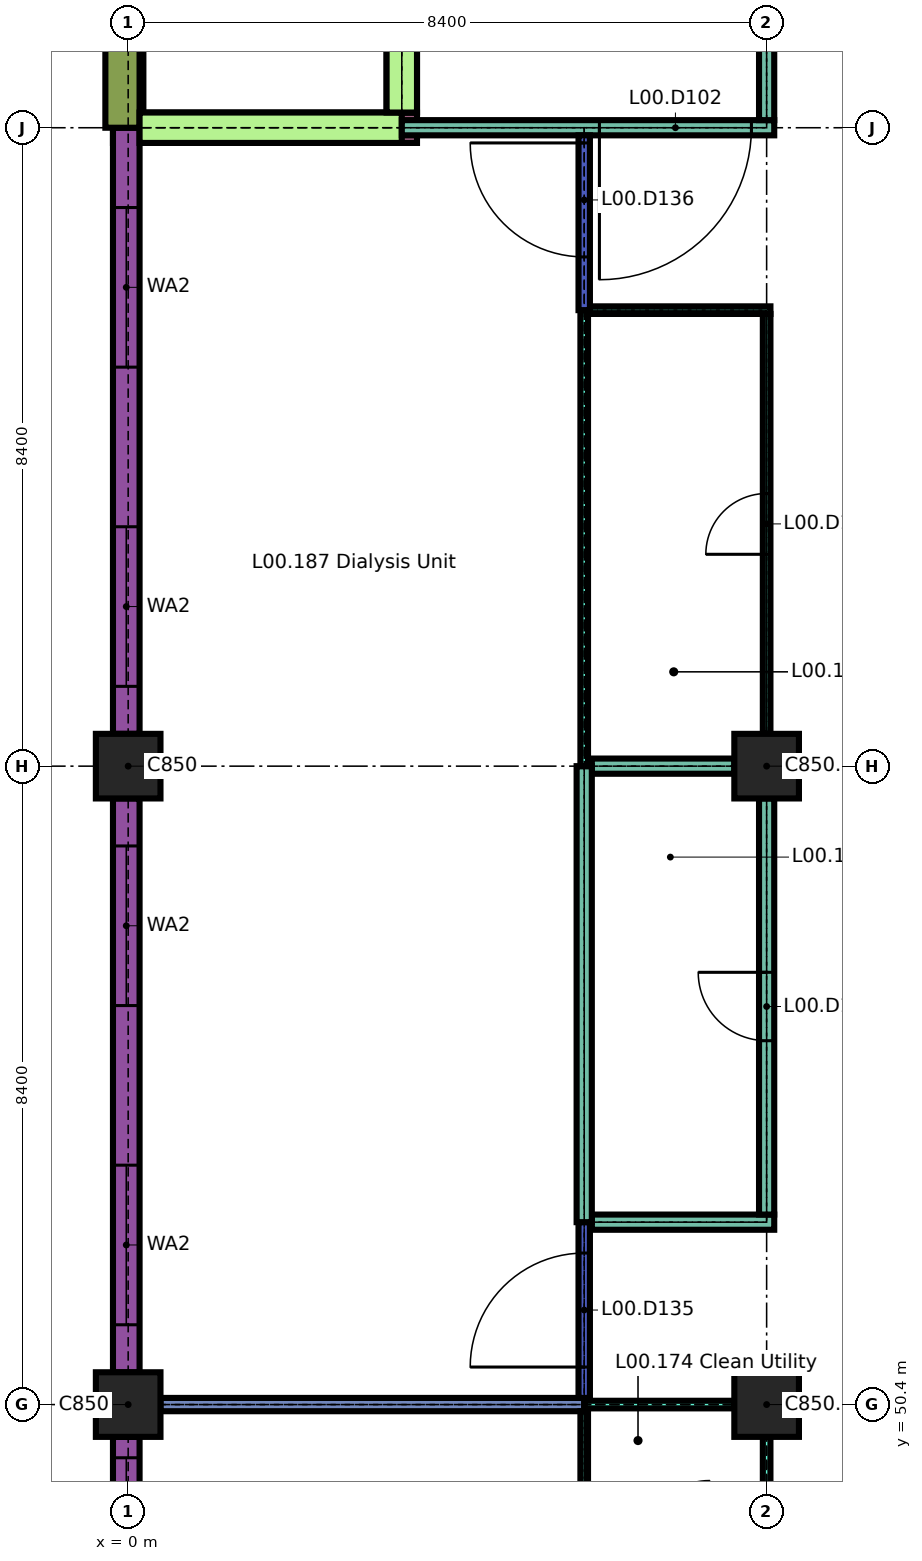
"""IFC4 building model, lengths in metres.
Left out: names, types, materials, properties, quantities, classifications, styles, units other than length and angle.
Written with IfcOpenShell. Run it as: python <this file> out.ifc"""

import sys

from ifc_helpers import new_model, si_unit, direction, frame, frame_2d, origin, origin_2d, place, context, subcontext, project, spatial, rectangle, extrude, element, fill, save


model = new_model("IFC4")
c1 = context("Model", 3, precision=1e-05, world=origin(), true_north=direction((0.0, 1.0)))
c2 = subcontext(c1, "Body", "Model", "MODEL_VIEW")
j1 = project(units=[si_unit("LENGTHUNIT", "METRE"), si_unit("PLANEANGLEUNIT", "RADIAN")], contexts=[c1])
p1 = place(None, origin())
s1 = spatial("IfcSite", under=j1, at=p1, CompositionType="ELEMENT")
p2 = place(p1, origin())
s2 = spatial("IfcBuilding", under=s1, at=p2, CompositionType="ELEMENT")
p3 = place(p2, origin())
s3 = spatial("IfcBuildingStorey", under=s2, at=p3, CompositionType="ELEMENT", Elevation=0.0)
p4 = place(p3, frame((-0.2, 67.2, -1.4), z_axis=(0.0, 0.0, 1.0), x_axis=(1.0, 0.0, 0.0)))
e1 = element("IfcWall", 1, at=p4, inside=s3, PredefinedType="SOLIDWALL", context=c2, shape_type="SweptSolid", body=[
    extrude(rectangle(XDim=4.0, YDim=0.4, at=frame_2d((2.0, 0.0))), origin(), (0.0, 0.0, 1.0), 0.95),
])
for number, where, z_axis, x_axis in (
    (2, (0.0, 67.4, -1.4), (0.0, 0.0, 1.0), (0.0, 1.0, 0.0)),
    (3, (3.6, 67.4, -1.4), (0.0, 0.0, 1.0), (0.0, 1.0, 0.0)),
):
    element("IfcWall", number, at=place(p3, frame(where, z_axis=z_axis, x_axis=x_axis)), inside=s3, PredefinedType="SOLIDWALL", context=c2, shape_type="SweptSolid", body=[
        extrude(rectangle(XDim=8.0, YDim=0.4, at=frame_2d((4.0, 0.0))), origin(), (0.0, 0.0, 1.0), 0.95),
    ])
for number, where, z_axis, x_axis in (
    (4, (0.0, 50.4, 0.0), (0.0, 0.0, 1.0), (1.0, 0.0, 0.0)),
    (5, (8.4, 50.4, 0.0), (0.0, 0.0, 1.0), (1.0, 0.0, 0.0)),
    (6, (0.0, 58.8, 0.0), (0.0, 0.0, 1.0), (1.0, 0.0, 0.0)),
    (7, (8.4, 58.8, 0.0), (0.0, 0.0, 1.0), (1.0, 0.0, 0.0)),
):
    element("IfcColumn", number, at=place(p3, frame(where, z_axis=z_axis, x_axis=x_axis)), inside=s3, PredefinedType="COLUMN", context=c2, shape_type="SweptSolid", body=[
        extrude(rectangle(XDim=0.85, YDim=0.85, at=origin_2d()), origin(), (0.0, 0.0, 1.0), 4.14),
    ])
p5 = place(p3, frame((-0.025, 46.2, 0.0), z_axis=(0.0, 0.0, 1.0), x_axis=(0.0, 1.0, 0.0)))
e8 = element("IfcWall", 8, at=p5, inside=s3, PredefinedType="SOLIDWALL", context=c2, shape_type="SweptSolid", body=[
    extrude(rectangle(XDim=3.775, YDim=0.35, at=frame_2d((1.888, 0.0))), origin(), (0.0, 0.0, 1.0), 3.84),
])
p6 = place(p5, frame((0.7, 0.0, 1.0)))
e9 = element("IfcOpeningElement", 9, at=p6, cuts=e8, PredefinedType="OPENING", context=c2, shape_type="SweptSolid", body=[
    extrude(rectangle(XDim=2.8, YDim=1.5, at=frame_2d((1.4, 0.75))), frame((0.0, 0.185, 0.0), z_axis=(0.0, -1.0, 0.0), x_axis=(1.0, 0.0, 0.0)), (0.0, 0.0, 1.0), 0.37),
])
p7 = place(p3, frame((-0.025, 50.825, 0.0), z_axis=(0.0, 0.0, 1.0), x_axis=(0.0, 1.0, 0.0)))
e10 = element("IfcWall", 10, at=p7, inside=s3, PredefinedType="SOLIDWALL", context=c2, shape_type="SweptSolid", body=[
    extrude(rectangle(XDim=7.55, YDim=0.35, at=frame_2d((3.775, 0.0))), origin(), (0.0, 0.0, 1.0), 3.84),
])
p8 = place(p7, frame((0.625, 0.0, 0.9)))
e11 = element("IfcOpeningElement", 11, at=p8, cuts=e10, PredefinedType="OPENING", context=c2, shape_type="SweptSolid", body=[
    extrude(rectangle(XDim=2.1, YDim=2.1, at=frame_2d((1.05, 1.05))), frame((0.0, 0.185, 0.0), z_axis=(0.0, -1.0, 0.0), x_axis=(1.0, 0.0, 0.0)), (0.0, 0.0, 1.0), 0.37),
])
p9 = place(p7, frame((4.825, 0.0, 0.9)))
e12 = element("IfcOpeningElement", 12, at=p9, cuts=e10, PredefinedType="OPENING", context=c2, shape_type="SweptSolid", body=[
    extrude(rectangle(XDim=2.1, YDim=2.1, at=frame_2d((1.05, 1.05))), frame((0.0, 0.185, 0.0), z_axis=(0.0, -1.0, 0.0), x_axis=(1.0, 0.0, 0.0)), (0.0, 0.0, 1.0), 0.37),
])
p10 = place(p3, frame((-0.025, 59.225, 0.0), z_axis=(0.0, 0.0, 1.0), x_axis=(0.0, 1.0, 0.0)))
e13 = element("IfcWall", 13, at=p10, inside=s3, PredefinedType="SOLIDWALL", context=c2, shape_type="SweptSolid", body=[
    extrude(rectangle(XDim=7.975, YDim=0.35, at=frame_2d((3.987, 0.0))), origin(), (0.0, 0.0, 1.0), 3.84),
])
p11 = place(p10, frame((0.625, 0.0, 0.9)))
e14 = element("IfcOpeningElement", 14, at=p11, cuts=e13, PredefinedType="OPENING", context=c2, shape_type="SweptSolid", body=[
    extrude(rectangle(XDim=2.1, YDim=2.1, at=frame_2d((1.05, 1.05))), frame((0.0, 0.185, 0.0), z_axis=(0.0, -1.0, 0.0), x_axis=(1.0, 0.0, 0.0)), (0.0, 0.0, 1.0), 0.37),
])
p12 = place(p10, frame((4.825, 0.0, 0.9)))
e15 = element("IfcOpeningElement", 15, at=p12, cuts=e13, PredefinedType="OPENING", context=c2, shape_type="SweptSolid", body=[
    extrude(rectangle(XDim=2.1, YDim=2.1, at=frame_2d((1.05, 1.05))), frame((0.0, 0.185, 0.0), z_axis=(0.0, -1.0, 0.0), x_axis=(1.0, 0.0, 0.0)), (0.0, 0.0, 1.0), 0.37),
])
p13 = place(p3, frame((-0.075, 67.2, 0.0), z_axis=(0.0, 0.0, 1.0), x_axis=(0.0, 1.0, 0.0)))
e16 = element("IfcWall", 16, at=p13, inside=s3, PredefinedType="SOLIDWALL", context=c2, shape_type="SweptSolid", body=[
    extrude(rectangle(XDim=4.2, YDim=0.45, at=frame_2d((2.1, 0.0))), origin(), (0.0, 0.0, 1.0), 4.14),
])
p14 = place(p3, frame((0.425, 50.4, 0.0), z_axis=(0.0, 0.0, 1.0), x_axis=(1.0, 0.0, 0.0)))
e17 = element("IfcWall", 17, at=p14, inside=s3, PredefinedType="PARTITIONING", context=c2, shape_type="SweptSolid", body=[
    extrude(rectangle(XDim=5.575, YDim=0.175, at=frame_2d((2.788, 0.0))), origin(), (0.0, 0.0, 1.0), 4.14),
])
p15 = place(p3, frame((6.0, 50.4, 0.0), z_axis=(0.0, 0.0, 1.0), x_axis=(1.0, 0.0, 0.0)))
e18 = element("IfcWall", 18, at=p15, inside=s3, PredefinedType="PARTITIONING", context=c2, shape_type="SweptSolid", body=[
    extrude(rectangle(XDim=1.975, YDim=0.1, at=frame_2d((0.988, 0.0))), origin(), (0.0, 0.0, 1.0), 4.14),
])
p16 = place(p3, frame((6.1, 52.8, 0.0), z_axis=(0.0, 0.0, 1.0), x_axis=(1.0, 0.0, 0.0)))
e19 = element("IfcWall", 19, at=p16, inside=s3, PredefinedType="PARTITIONING", context=c2, shape_type="SweptSolid", body=[
    extrude(rectangle(XDim=2.4, YDim=0.2, at=frame_2d((1.2, 0.0))), origin(), (0.0, 0.0, 1.0), 4.14),
])
p17 = place(p3, frame((6.1, 58.8, 0.0), z_axis=(0.0, 0.0, 1.0), x_axis=(1.0, 0.0, 0.0)))
e20 = element("IfcWall", 20, at=p17, inside=s3, PredefinedType="PARTITIONING", context=c2, shape_type="SweptSolid", body=[
    extrude(rectangle(XDim=1.875, YDim=0.2, at=frame_2d((0.938, 0.0))), origin(), (0.0, 0.0, 1.0), 4.14),
])
p18 = place(p3, frame((6.075, 64.8, 0.0), z_axis=(0.0, 0.0, 1.0), x_axis=(1.0, 0.0, 0.0)))
e21 = element("IfcWall", 21, at=p18, inside=s3, PredefinedType="PARTITIONING", context=c2, shape_type="SweptSolid", body=[
    extrude(rectangle(XDim=2.375, YDim=0.1, at=frame_2d((1.188, 0.0))), origin(), (0.0, 0.0, 1.0), 4.14),
])
p19 = place(p3, frame((0.15, 67.2, 0.0), z_axis=(0.0, 0.0, 1.0), x_axis=(1.0, 0.0, 0.0)))
e22 = element("IfcWall", 22, at=p19, inside=s3, PredefinedType="SHEAR", context=c2, shape_type="SweptSolid", body=[
    extrude(rectangle(XDim=3.45, YDim=0.4, at=frame_2d((1.725, 0.0))), origin(), (0.0, 0.0, 1.0), 4.14),
])
p20 = place(p3, frame((3.6, 67.2, 0.0), z_axis=(0.0, 0.0, 1.0), x_axis=(1.0, 0.0, 0.0)))
e23 = element("IfcWall", 23, at=p20, inside=s3, PredefinedType="PARTITIONING", context=c2, shape_type="SweptSolid", body=[
    extrude(rectangle(XDim=4.9, YDim=0.2, at=frame_2d((2.45, 0.0))), origin(), (0.0, 0.0, 1.0), 4.14),
])
p21 = place(p20, frame((2.6, 0.0, 0.0)))
e24 = element("IfcOpeningElement", 24, at=p21, cuts=e23, PredefinedType="OPENING", context=c2, shape_type="SweptSolid", body=[
    extrude(rectangle(XDim=2.0, YDim=2.4, at=frame_2d((1.0, 1.2))), frame((0.0, 0.11, 0.0), z_axis=(0.0, -1.0, 0.0), x_axis=(1.0, 0.0, 0.0)), (0.0, 0.0, 1.0), 0.22),
])
p22 = place(p3, frame((3.6, 67.4, 0.0), z_axis=(0.0, 0.0, 1.0), x_axis=(0.0, 1.0, 0.0)))
e25 = element("IfcWall", 25, at=p22, inside=s3, PredefinedType="SHEAR", context=c2, shape_type="SweptSolid", body=[
    extrude(rectangle(XDim=8.1, YDim=0.4, at=frame_2d((4.05, 0.0))), origin(), (0.0, 0.0, 1.0), 4.14),
])
p23 = place(p22, frame((1.35, 0.0, 0.0)))
e26 = element("IfcOpeningElement", 26, at=p23, cuts=e25, PredefinedType="OPENING", context=c2, shape_type="SweptSolid", body=[
    extrude(rectangle(XDim=1.3, YDim=2.1, at=frame_2d((0.65, 1.05))), frame((0.0, 0.21, 0.0), z_axis=(0.0, -1.0, 0.0), x_axis=(1.0, 0.0, 0.0)), (0.0, 0.0, 1.0), 0.42),
])
p24 = place(p22, frame((5.5, 0.0, 0.0)))
e27 = element("IfcOpeningElement", 27, at=p24, cuts=e25, PredefinedType="OPENING", context=c2, shape_type="SweptSolid", body=[
    extrude(rectangle(XDim=1.1, YDim=2.1, at=frame_2d((0.55, 1.05))), frame((0.0, 0.21, 0.0), z_axis=(0.0, -1.0, 0.0), x_axis=(1.0, 0.0, 0.0)), (0.0, 0.0, 1.0), 0.42),
])
p25 = place(p3, frame((6.0, 48.6, 0.0), z_axis=(0.0, 0.0, 1.0), x_axis=(0.0, 1.0, 0.0)))
e28 = element("IfcWall", 28, at=p25, inside=s3, PredefinedType="PARTITIONING", context=c2, shape_type="SweptSolid", body=[
    extrude(rectangle(XDim=1.712, YDim=0.1, at=frame_2d((0.856, 0.0))), origin(), (0.0, 0.0, 1.0), 4.14),
])
p26 = place(p3, frame((6.0, 50.488, 0.0), z_axis=(0.0, 0.0, 1.0), x_axis=(0.0, 1.0, 0.0)))
e29 = element("IfcWall", 29, at=p26, inside=s3, PredefinedType="PARTITIONING", context=c2, shape_type="SweptSolid", body=[
    extrude(rectangle(XDim=2.312, YDim=0.15, at=frame_2d((1.156, 0.0))), origin(), (0.0, 0.0, 1.0), 4.14),
])
p27 = place(p26, frame((0.406, 0.0, 0.0)))
e30 = element("IfcOpeningElement", 30, at=p27, cuts=e29, PredefinedType="OPENING", context=c2, shape_type="SweptSolid", body=[
    extrude(rectangle(XDim=1.5, YDim=2.4, at=frame_2d((0.75, 1.2))), frame((0.0, 0.085, 0.0), z_axis=(0.0, -1.0, 0.0), x_axis=(1.0, 0.0, 0.0)), (0.0, 0.0, 1.0), 0.17),
])
p28 = place(p3, frame((6.0, 52.8, 0.0), z_axis=(0.0, 0.0, 1.0), x_axis=(0.0, 1.0, 0.0)))
e31 = element("IfcWall", 31, at=p28, inside=s3, PredefinedType="PARTITIONING", context=c2, shape_type="SweptSolid", body=[
    extrude(rectangle(XDim=6.0, YDim=0.2, at=frame_2d((3.0, 0.0))), origin(), (0.0, 0.0, 1.0), 4.14),
])
p29 = place(p3, frame((6.0, 58.8, 0.0), z_axis=(0.0, 0.0, 1.0), x_axis=(0.0, 1.0, 0.0)))
e32 = element("IfcWall", 32, at=p29, inside=s3, PredefinedType="PARTITIONING", context=c2, shape_type="SweptSolid", body=[
    extrude(rectangle(XDim=6.0, YDim=0.1, at=frame_2d((3.0, 0.0))), origin(), (0.0, 0.0, 1.0), 4.14),
])
p30 = place(p3, frame((6.0, 64.8, 0.0), z_axis=(0.0, 0.0, 1.0), x_axis=(0.0, 1.0, 0.0)))
e33 = element("IfcWall", 33, at=p30, inside=s3, PredefinedType="PARTITIONING", context=c2, shape_type="SweptSolid", body=[
    extrude(rectangle(XDim=2.3, YDim=0.15, at=frame_2d((1.15, 0.0))), origin(), (0.0, 0.0, 1.0), 4.14),
])
p31 = place(p30, frame((0.7, 0.0, 0.0)))
e34 = element("IfcOpeningElement", 34, at=p31, cuts=e33, PredefinedType="OPENING", context=c2, shape_type="SweptSolid", body=[
    extrude(rectangle(XDim=1.5, YDim=2.4, at=frame_2d((0.75, 1.2))), frame((0.0, 0.085, 0.0), z_axis=(0.0, -1.0, 0.0), x_axis=(1.0, 0.0, 0.0)), (0.0, 0.0, 1.0), 0.17),
])
p32 = place(p3, frame((8.4, 48.65, 0.0), z_axis=(0.0, 0.0, 1.0), x_axis=(0.0, 1.0, 0.0)))
e35 = element("IfcWall", 35, at=p32, inside=s3, PredefinedType="PARTITIONING", context=c2, shape_type="SweptSolid", body=[
    extrude(rectangle(XDim=1.325, YDim=0.1, at=frame_2d((0.663, 0.0))), origin(), (0.0, 0.0, 1.0), 4.14),
])
p33 = place(p3, frame((8.4, 52.9, 0.0), z_axis=(0.0, 0.0, 1.0), x_axis=(0.0, 1.0, 0.0)))
e36 = element("IfcWall", 36, at=p33, inside=s3, PredefinedType="PARTITIONING", context=c2, shape_type="SweptSolid", body=[
    extrude(rectangle(XDim=5.475, YDim=0.2, at=frame_2d((2.738, 0.0))), origin(), (0.0, 0.0, 1.0), 4.14),
])
p34 = place(p33, frame((2.288, 0.0, 0.0)))
e37 = element("IfcOpeningElement", 37, at=p34, cuts=e36, PredefinedType="OPENING", context=c2, shape_type="SweptSolid", body=[
    extrude(rectangle(XDim=0.9, YDim=2.1, at=frame_2d((0.45, 1.05))), frame((0.0, 0.11, 0.0), z_axis=(0.0, -1.0, 0.0), x_axis=(1.0, 0.0, 0.0)), (0.0, 0.0, 1.0), 0.22),
])
p35 = place(p3, frame((8.4, 59.225, 0.0), z_axis=(0.0, 0.0, 1.0), x_axis=(0.0, 1.0, 0.0)))
e38 = element("IfcWall", 38, at=p35, inside=s3, PredefinedType="PARTITIONING", context=c2, shape_type="SweptSolid", body=[
    extrude(rectangle(XDim=5.525, YDim=0.1, at=frame_2d((2.762, 0.0))), origin(), (0.0, 0.0, 1.0), 4.14),
])
p36 = place(p35, frame((2.363, 0.0, 0.0)))
e39 = element("IfcOpeningElement", 39, at=p36, cuts=e38, PredefinedType="OPENING", context=c2, shape_type="SweptSolid", body=[
    extrude(rectangle(XDim=0.8, YDim=2.1, at=frame_2d((0.4, 1.05))), frame((0.0, 0.06, 0.0), z_axis=(0.0, -1.0, 0.0), x_axis=(1.0, 0.0, 0.0)), (0.0, 0.0, 1.0), 0.12),
])
p37 = place(p3, frame((8.4, 67.3, 0.0), z_axis=(0.0, 0.0, 1.0), x_axis=(0.0, 1.0, 0.0)))
e40 = element("IfcWall", 40, at=p37, inside=s3, PredefinedType="PARTITIONING", context=c2, shape_type="SweptSolid", body=[
    extrude(rectangle(XDim=8.3, YDim=0.2, at=frame_2d((4.15, 0.0))), origin(), (0.0, 0.0, 1.0), 4.14),
])
p38 = place(p6, origin())
e41 = element("IfcWindow", 41, at=p38, inside=s3, PartitioningType="DOUBLE_PANEL_VERTICAL", PredefinedType="WINDOW", context=c2, shape_type="SweptSolid", body=[
    extrude(rectangle(XDim=2.8, YDim=1.5, at=frame_2d((1.4, 0.75))), frame((0.0, 0.03, 0.0), z_axis=(0.0, -1.0, 0.0), x_axis=(1.0, 0.0, 0.0)), (0.0, 0.0, 1.0), 0.06),
])
fill(e9, e41)
p39 = place(p8, origin())
e42 = element("IfcWindow", 42, at=p39, inside=s3, PartitioningType="DOUBLE_PANEL_VERTICAL", PredefinedType="WINDOW", context=c2, shape_type="SweptSolid", body=[
    extrude(rectangle(XDim=2.1, YDim=2.1, at=frame_2d((1.05, 1.05))), frame((0.0, 0.03, 0.0), z_axis=(0.0, -1.0, 0.0), x_axis=(1.0, 0.0, 0.0)), (0.0, 0.0, 1.0), 0.06),
])
fill(e11, e42)
p40 = place(p9, origin())
e43 = element("IfcWindow", 43, at=p40, inside=s3, PartitioningType="DOUBLE_PANEL_VERTICAL", PredefinedType="WINDOW", context=c2, shape_type="SweptSolid", body=[
    extrude(rectangle(XDim=2.1, YDim=2.1, at=frame_2d((1.05, 1.05))), frame((0.0, 0.03, 0.0), z_axis=(0.0, -1.0, 0.0), x_axis=(1.0, 0.0, 0.0)), (0.0, 0.0, 1.0), 0.06),
])
fill(e12, e43)
p41 = place(p11, origin())
e44 = element("IfcWindow", 44, at=p41, inside=s3, PartitioningType="DOUBLE_PANEL_VERTICAL", PredefinedType="WINDOW", context=c2, shape_type="SweptSolid", body=[
    extrude(rectangle(XDim=2.1, YDim=2.1, at=frame_2d((1.05, 1.05))), frame((0.0, 0.03, 0.0), z_axis=(0.0, -1.0, 0.0), x_axis=(1.0, 0.0, 0.0)), (0.0, 0.0, 1.0), 0.06),
])
fill(e14, e44)
p42 = place(p12, origin())
e45 = element("IfcWindow", 45, at=p42, inside=s3, PartitioningType="DOUBLE_PANEL_VERTICAL", PredefinedType="WINDOW", context=c2, shape_type="SweptSolid", body=[
    extrude(rectangle(XDim=2.1, YDim=2.1, at=frame_2d((1.05, 1.05))), frame((0.0, 0.03, 0.0), z_axis=(0.0, -1.0, 0.0), x_axis=(1.0, 0.0, 0.0)), (0.0, 0.0, 1.0), 0.06),
])
fill(e15, e45)
p43 = place(p21, origin())
e46 = element("IfcDoor", 46, at=p43, inside=s3, OperationType="SINGLE_SWING_LEFT", PredefinedType="DOOR", context=c2, shape_type="SweptSolid", body=[
    extrude(rectangle(XDim=2.0, YDim=2.4, at=frame_2d((1.0, 1.2))), frame((0.0, 0.03, 0.0), z_axis=(0.0, -1.0, 0.0), x_axis=(1.0, 0.0, 0.0)), (0.0, 0.0, 1.0), 0.06),
])
fill(e24, e46)
p44 = place(p27, origin())
e47 = element("IfcDoor", 47, at=p44, inside=s3, OperationType="SINGLE_SWING_RIGHT", PredefinedType="DOOR", context=c2, shape_type="SweptSolid", body=[
    extrude(rectangle(XDim=1.5, YDim=2.4, at=frame_2d((0.75, 1.2))), frame((0.0, 0.03, 0.0), z_axis=(0.0, -1.0, 0.0), x_axis=(1.0, 0.0, 0.0)), (0.0, 0.0, 1.0), 0.06),
])
fill(e30, e47)
p45 = place(p31, origin())
e48 = element("IfcDoor", 48, at=p45, inside=s3, OperationType="SINGLE_SWING_LEFT", PredefinedType="DOOR", context=c2, shape_type="SweptSolid", body=[
    extrude(rectangle(XDim=1.5, YDim=2.4, at=frame_2d((0.75, 1.2))), frame((0.0, 0.03, 0.0), z_axis=(0.0, -1.0, 0.0), x_axis=(1.0, 0.0, 0.0)), (0.0, 0.0, 1.0), 0.06),
])
fill(e34, e48)
p46 = place(p34, origin())
e49 = element("IfcDoor", 49, at=p46, inside=s3, OperationType="SINGLE_SWING_LEFT", PredefinedType="DOOR", context=c2, shape_type="SweptSolid", body=[
    extrude(rectangle(XDim=0.9, YDim=2.1, at=frame_2d((0.45, 1.05))), frame((0.0, 0.025, 0.0), z_axis=(0.0, -1.0, 0.0), x_axis=(1.0, 0.0, 0.0)), (0.0, 0.0, 1.0), 0.05),
])
fill(e37, e49)
p47 = place(p36, origin())
e50 = element("IfcDoor", 50, at=p47, inside=s3, OperationType="SINGLE_SWING_RIGHT", PredefinedType="DOOR", context=c2, shape_type="SweptSolid", body=[
    extrude(rectangle(XDim=0.8, YDim=2.1, at=frame_2d((0.4, 1.05))), frame((0.0, 0.02, 0.0), z_axis=(0.0, -1.0, 0.0), x_axis=(1.0, 0.0, 0.0)), (0.0, 0.0, 1.0), 0.04),
])
fill(e39, e50)
save(model, sys.argv[1])
